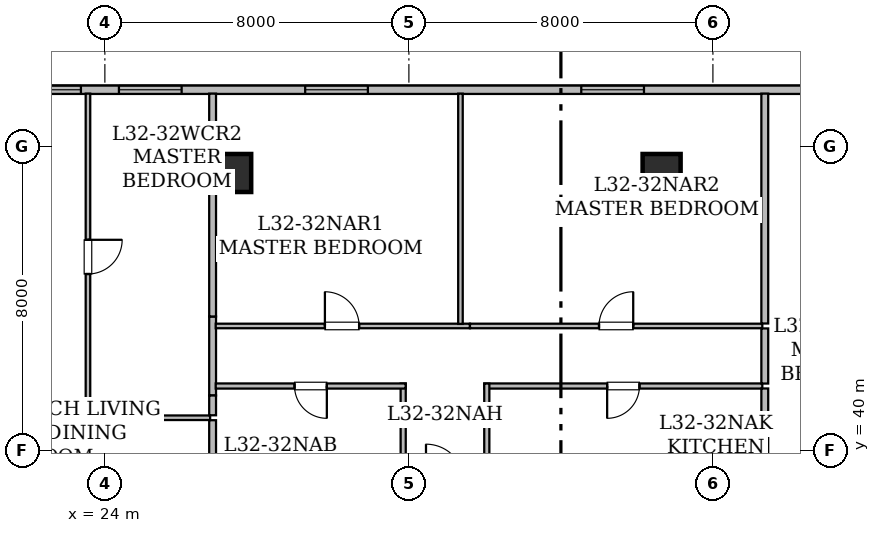
"""IFC4 building model, lengths in metres.
Left out: names, types, materials, properties, quantities, classifications, styles, units other than length and angle.
Written with IfcOpenShell. Run it as: python <this file> out.ifc"""

import sys

from ifc_helpers import new_model, si_unit, direction, frame, frame_2d, origin, origin_2d, place, context, subcontext, project, spatial, rectangle, hollow_rectangle, extrude, element, fill, save


model = new_model("IFC4")
c1 = context("Model", 3, precision=1e-05, world=origin(), true_north=direction((0.0, 1.0)))
c2 = subcontext(c1, "Body", "Model", "MODEL_VIEW")
j1 = project(units=[si_unit("LENGTHUNIT", "METRE"), si_unit("PLANEANGLEUNIT", "RADIAN")], contexts=[c1])
p1 = place(None, origin())
s1 = spatial("IfcSite", under=j1, at=p1, CompositionType="ELEMENT")
p2 = place(p1, origin())
s2 = spatial("IfcBuilding", under=s1, at=p2, CompositionType="ELEMENT")
p3 = place(p2, frame((0.0, 0.0, 127.45)))
s3 = spatial("IfcBuildingStorey", under=s2, at=p3, CompositionType="ELEMENT", Elevation=127.45)
for number, where, z_axis, x_axis in (
    (1, (27.35, 47.3, 0.0), (0.0, 0.0, 1.0), (1.0, 0.0, 0.0)),
    (2, (38.65, 47.3, 0.0), (0.0, 0.0, 1.0), (1.0, 0.0, 0.0)),
):
    element("IfcColumn", number, at=place(p3, frame(where, z_axis=z_axis, x_axis=x_axis)), inside=s3, PredefinedType="COLUMN", context=c2, shape_type="SweptSolid", body=[
        extrude(hollow_rectangle(XDim=1.0, YDim=1.0, WallThickness=0.05, at=origin_2d()), origin(), (0.0, 0.0, 1.0), 3.65),
    ])
p4 = place(p3, frame((13.715, 49.49, 0.0), z_axis=(0.0, 0.0, 1.0), x_axis=(1.0, 0.0, 0.0)))
e3 = element("IfcWall", 3, at=p4, inside=s3, PredefinedType="STANDARD", context=c2, shape_type="SweptSolid", body=[
    extrude(rectangle(XDim=38.639, YDim=0.22, at=frame_2d((19.319, 0.0))), origin(), (0.0, 0.0, 1.0), 3.43),
])
p5 = place(p4, frame((2.243, 0.0, 0.85)))
e4 = element("IfcOpeningElement", 4, at=p5, cuts=e3, PredefinedType="OPENING", context=c2, shape_type="SweptSolid", body=[
    extrude(rectangle(XDim=1.65, YDim=1.55, at=frame_2d((0.825, 0.775))), frame((0.0, 0.12, 0.0), z_axis=(0.0, -1.0, 0.0), x_axis=(1.0, 0.0, 0.0)), (0.0, 0.0, 1.0), 0.24),
])
p6 = place(p4, frame((8.455, 0.0, 0.8)))
e5 = element("IfcOpeningElement", 5, at=p6, cuts=e3, PredefinedType="OPENING", context=c2, shape_type="SweptSolid", body=[
    extrude(rectangle(XDim=1.2, YDim=1.5, at=frame_2d((0.6, 0.75))), frame((0.0, 0.12, 0.0), z_axis=(0.0, -1.0, 0.0), x_axis=(1.0, 0.0, 0.0)), (0.0, 0.0, 1.0), 0.24),
])
p7 = place(p4, frame((5.805, 0.0, 0.85)))
e6 = element("IfcOpeningElement", 6, at=p7, cuts=e3, PredefinedType="OPENING", context=c2, shape_type="SweptSolid", body=[
    extrude(rectangle(XDim=1.65, YDim=1.55, at=frame_2d((0.825, 0.775))), frame((0.0, 0.12, 0.0), z_axis=(0.0, -1.0, 0.0), x_axis=(1.0, 0.0, 0.0)), (0.0, 0.0, 1.0), 0.24),
])
p8 = place(p4, frame((10.655, 0.0, 0.85)))
e7 = element("IfcOpeningElement", 7, at=p8, cuts=e3, PredefinedType="OPENING", context=c2, shape_type="SweptSolid", body=[
    extrude(rectangle(XDim=1.65, YDim=1.55, at=frame_2d((0.825, 0.775))), frame((0.0, 0.12, 0.0), z_axis=(0.0, -1.0, 0.0), x_axis=(1.0, 0.0, 0.0)), (0.0, 0.0, 1.0), 0.24),
])
p9 = place(p4, frame((15.556, 0.0, 0.85)))
e8 = element("IfcOpeningElement", 8, at=p9, cuts=e3, PredefinedType="OPENING", context=c2, shape_type="SweptSolid", body=[
    extrude(rectangle(XDim=1.65, YDim=1.55, at=frame_2d((0.825, 0.775))), frame((0.0, 0.12, 0.0), z_axis=(0.0, -1.0, 0.0), x_axis=(1.0, 0.0, 0.0)), (0.0, 0.0, 1.0), 0.24),
])
p10 = place(p4, frame((22.821, 0.0, 0.85)))
e9 = element("IfcOpeningElement", 9, at=p10, cuts=e3, PredefinedType="OPENING", context=c2, shape_type="SweptSolid", body=[
    extrude(rectangle(XDim=1.65, YDim=1.55, at=frame_2d((0.825, 0.775))), frame((0.0, 0.12, 0.0), z_axis=(0.0, -1.0, 0.0), x_axis=(1.0, 0.0, 0.0)), (0.0, 0.0, 1.0), 0.24),
])
p11 = place(p4, frame((32.239, 0.0, 0.85)))
e10 = element("IfcOpeningElement", 10, at=p11, cuts=e3, PredefinedType="OPENING", context=c2, shape_type="SweptSolid", body=[
    extrude(rectangle(XDim=1.65, YDim=1.55, at=frame_2d((0.825, 0.775))), frame((0.0, 0.12, 0.0), z_axis=(0.0, -1.0, 0.0), x_axis=(1.0, 0.0, 0.0)), (0.0, 0.0, 1.0), 0.24),
])
p12 = place(p4, frame((28.676, 0.0, 0.85)))
e11 = element("IfcOpeningElement", 11, at=p12, cuts=e3, PredefinedType="OPENING", context=c2, shape_type="SweptSolid", body=[
    extrude(rectangle(XDim=1.65, YDim=1.55, at=frame_2d((0.825, 0.775))), frame((0.0, 0.12, 0.0), z_axis=(0.0, -1.0, 0.0), x_axis=(1.0, 0.0, 0.0)), (0.0, 0.0, 1.0), 0.24),
])
p13 = place(p4, frame((35.489, 0.0, 0.85)))
e12 = element("IfcOpeningElement", 12, at=p13, cuts=e3, PredefinedType="OPENING", context=c2, shape_type="SweptSolid", body=[
    extrude(rectangle(XDim=1.65, YDim=1.55, at=frame_2d((0.825, 0.775))), frame((0.0, 0.12, 0.0), z_axis=(0.0, -1.0, 0.0), x_axis=(1.0, 0.0, 0.0)), (0.0, 0.0, 1.0), 0.24),
])
p14 = place(p3, frame((23.555, 49.388, 0.0), z_axis=(0.0, 0.0, 1.0), x_axis=(0.0, -1.0, 0.0)))
e13 = element("IfcWall", 13, at=p14, inside=s3, PredefinedType="PARTITIONING", context=c2, shape_type="SweptSolid", body=[
    extrude(rectangle(XDim=8.593, YDim=0.12, at=frame_2d((4.296, 0.0))), origin(), (0.0, 0.0, 1.0), 2.876),
])
p15 = place(p14, frame((3.846, 0.0, 0.0)))
e14 = element("IfcOpeningElement", 14, at=p15, cuts=e13, PredefinedType="OPENING", context=c2, shape_type="SweptSolid", body=[
    extrude(rectangle(XDim=0.9, YDim=2.1, at=frame_2d((0.45, 1.05))), frame((0.0, 0.07, 0.0), z_axis=(0.0, -1.0, 0.0), x_axis=(1.0, 0.0, 0.0)), (0.0, 0.0, 1.0), 0.14),
])
p16 = place(p3, frame((23.49, 40.86, 0.0), z_axis=(0.0, 0.0, 1.0), x_axis=(1.0, 0.0, 0.0)))
e15 = element("IfcWall", 15, at=p16, inside=s3, PredefinedType="PARTITIONING", context=c2, shape_type="SweptSolid", body=[
    extrude(rectangle(XDim=3.28, YDim=0.12, at=frame_2d((1.64, 0.0))), origin(), (0.0, 0.0, 1.0), 3.43),
])
p17 = place(p3, frame((26.835, 40.795, 0.0), z_axis=(0.0, 0.0, 1.0), x_axis=(0.0, -1.0, 0.0)))
e16 = element("IfcWall", 16, at=p17, inside=s3, PredefinedType="STANDARD", context=c2, shape_type="SweptSolid", body=[
    extrude(rectangle(XDim=1.45, YDim=0.18, at=frame_2d((0.725, 0.0))), origin(), (0.0, 0.0, 1.0), 3.43),
])
p18 = place(p3, frame((26.835, 43.524, 0.0), z_axis=(0.0, 0.0, 1.0), x_axis=(0.0, -1.0, 0.0)))
e17 = element("IfcWall", 17, at=p18, inside=s3, PredefinedType="STANDARD", context=c2, shape_type="SweptSolid", body=[
    extrude(rectangle(XDim=2.078, YDim=0.18, at=frame_2d((1.039, 0.0))), origin(), (0.0, 0.0, 1.0), 3.43),
])
p19 = place(p3, frame((26.835, 41.446, 0.0), z_axis=(0.0, 0.0, 1.0), x_axis=(0.0, -1.0, 0.0)))
e18 = element("IfcWall", 18, at=p19, inside=s3, PredefinedType="STANDARD", context=c2, shape_type="SweptSolid", body=[
    extrude(rectangle(XDim=0.521, YDim=0.18, at=frame_2d((0.26, 0.0))), origin(), (0.0, 0.0, 1.0), 3.43),
])
p20 = place(p3, frame((26.835, 49.388, 0.0), z_axis=(0.0, 0.0, 1.0), x_axis=(0.0, -1.0, 0.0)))
e19 = element("IfcWall", 19, at=p20, inside=s3, PredefinedType="STANDARD", context=c2, shape_type="SweptSolid", body=[
    extrude(rectangle(XDim=5.864, YDim=0.18, at=frame_2d((2.932, 0.0))), origin(), (0.0, 0.0, 1.0), 2.876),
])
p21 = place(p3, frame((31.85, 39.232, 0.0), z_axis=(0.0, 0.0, 1.0), x_axis=(0.0, 1.0, 0.0)))
e20 = element("IfcWall", 20, at=p21, inside=s3, PredefinedType="PARTITIONING", context=c2, shape_type="SweptSolid", body=[
    extrude(rectangle(XDim=2.528, YDim=0.135, at=frame_2d((1.264, 0.0))), origin(), (0.0, 0.0, 1.0), 3.43),
])
p22 = place(p3, frame((31.915, 41.695, 0.0), z_axis=(0.0, 0.0, 1.0), x_axis=(-1.0, 0.0, 0.0)))
e21 = element("IfcWall", 21, at=p22, inside=s3, PredefinedType="PARTITIONING", context=c2, shape_type="SweptSolid", body=[
    extrude(rectangle(XDim=4.998, YDim=0.135, at=frame_2d((2.499, 0.0))), origin(), (0.0, 0.0, 1.0), 2.647),
])
p23 = place(p22, frame((2.074, 0.0, 0.0)))
e22 = element("IfcOpeningElement", 22, at=p23, cuts=e21, PredefinedType="OPENING", context=c2, shape_type="SweptSolid", body=[
    extrude(rectangle(XDim=0.85, YDim=2.1, at=frame_2d((0.425, 1.05))), frame((0.0, 0.077, 0.0), z_axis=(0.0, -1.0, 0.0), x_axis=(1.0, 0.0, 0.0)), (0.0, 0.0, 1.0), 0.155),
])
p24 = place(p3, frame((41.3, 41.695, 0.0), z_axis=(0.0, 0.0, 1.0), x_axis=(-1.0, 0.0, 0.0)))
e23 = element("IfcWall", 23, at=p24, inside=s3, PredefinedType="PARTITIONING", context=c2, shape_type="SweptSolid", body=[
    extrude(rectangle(XDim=7.315, YDim=0.135, at=frame_2d((3.657, 0.0))), origin(), (0.0, 0.0, 1.0), 2.647),
])
p25 = place(p24, frame((3.233, 0.0, 0.0)))
e24 = element("IfcOpeningElement", 24, at=p25, cuts=e23, PredefinedType="OPENING", context=c2, shape_type="SweptSolid", body=[
    extrude(rectangle(XDim=0.85, YDim=2.1, at=frame_2d((0.425, 1.05))), frame((0.0, 0.077, 0.0), z_axis=(0.0, -1.0, 0.0), x_axis=(1.0, 0.0, 0.0)), (0.0, 0.0, 1.0), 0.155),
])
p26 = place(p3, frame((34.05, 41.76, 0.0), z_axis=(0.0, 0.0, 1.0), x_axis=(0.0, -1.0, 0.0)))
e25 = element("IfcWall", 25, at=p26, inside=s3, PredefinedType="PARTITIONING", context=c2, shape_type="SweptSolid", body=[
    extrude(rectangle(XDim=2.528, YDim=0.135, at=frame_2d((1.264, 0.0))), origin(), (0.0, 0.0, 1.0), 3.43),
])
p27 = place(p3, frame((26.917, 43.275, 0.0), z_axis=(0.0, 0.0, 1.0), x_axis=(1.0, 0.0, 0.0)))
e26 = element("IfcWall", 26, at=p27, inside=s3, PredefinedType="PARTITIONING", context=c2, shape_type="SweptSolid", body=[
    extrude(rectangle(XDim=6.69, YDim=0.12, at=frame_2d((3.345, 0.0))), origin(), (0.0, 0.0, 1.0), 2.647),
])
p28 = place(p27, frame((2.873, 0.0, 0.0)))
e27 = element("IfcOpeningElement", 27, at=p28, cuts=e26, PredefinedType="OPENING", context=c2, shape_type="SweptSolid", body=[
    extrude(rectangle(XDim=0.9, YDim=2.1, at=frame_2d((0.45, 1.05))), frame((0.0, 0.07, 0.0), z_axis=(0.0, -1.0, 0.0), x_axis=(1.0, 0.0, 0.0)), (0.0, 0.0, 1.0), 0.14),
])
p29 = place(p3, frame((33.607, 43.275, 0.0), z_axis=(0.0, 0.0, 1.0), x_axis=(1.0, 0.0, 0.0)))
e28 = element("IfcWall", 28, at=p29, inside=s3, PredefinedType="PARTITIONING", context=c2, shape_type="SweptSolid", body=[
    extrude(rectangle(XDim=7.693, YDim=0.12, at=frame_2d((3.847, 0.0))), origin(), (0.0, 0.0, 1.0), 2.647),
])
p30 = place(p29, frame((3.396, 0.0, 0.0)))
e29 = element("IfcOpeningElement", 29, at=p30, cuts=e28, PredefinedType="OPENING", context=c2, shape_type="SweptSolid", body=[
    extrude(rectangle(XDim=0.9, YDim=2.1, at=frame_2d((0.45, 1.05))), frame((0.0, 0.07, 0.0), z_axis=(0.0, -1.0, 0.0), x_axis=(1.0, 0.0, 0.0)), (0.0, 0.0, 1.0), 0.14),
])
p31 = place(p3, frame((41.365, 43.21, 0.0), z_axis=(0.0, 0.0, 1.0), x_axis=(0.0, -1.0, 0.0)))
e30 = element("IfcWall", 30, at=p31, inside=s3, PredefinedType="STANDARD", context=c2, shape_type="SweptSolid", body=[
    extrude(rectangle(XDim=1.45, YDim=0.18, at=frame_2d((0.725, 0.0))), origin(), (0.0, 0.0, 1.0), 3.43),
])
p32 = place(p3, frame((41.365, 41.63, 0.0), z_axis=(0.0, 0.0, 1.0), x_axis=(0.0, -1.0, 0.0)))
e31 = element("IfcWall", 31, at=p32, inside=s3, PredefinedType="STANDARD", context=c2, shape_type="SweptSolid", body=[
    extrude(rectangle(XDim=2.4, YDim=0.18, at=frame_2d((1.2, 0.0))), origin(), (0.0, 0.0, 1.0), 3.43),
])
p33 = place(p3, frame((33.357, 49.388, 0.0), z_axis=(0.0, 0.0, 1.0), x_axis=(0.0, -1.0, 0.0)))
e32 = element("IfcWall", 32, at=p33, inside=s3, PredefinedType="PARTITIONING", context=c2, shape_type="SweptSolid", body=[
    extrude(rectangle(XDim=6.059, YDim=0.12, at=frame_2d((3.029, 0.0))), origin(), (0.0, 0.0, 1.0), 2.876),
])
p34 = place(p3, frame((41.365, 49.388, 0.0), z_axis=(0.0, 0.0, 1.0), x_axis=(0.0, -1.0, 0.0)))
e33 = element("IfcWall", 33, at=p34, inside=s3, PredefinedType="STANDARD", context=c2, shape_type="SweptSolid", body=[
    extrude(rectangle(XDim=6.048, YDim=0.18, at=frame_2d((3.024, 0.0))), origin(), (0.0, 0.0, 1.0), 2.876),
])
p35 = place(p6, origin())
e34 = element("IfcWindow", 34, at=p35, inside=s3, PartitioningType="SINGLE_PANEL", PredefinedType="WINDOW", context=c2, shape_type="SweptSolid", body=[
    extrude(rectangle(XDim=1.2, YDim=1.5, at=frame_2d((0.6, 0.75))), frame((0.0, 0.03, 0.0), z_axis=(0.0, -1.0, 0.0), x_axis=(1.0, 0.0, 0.0)), (0.0, 0.0, 1.0), 0.06),
])
fill(e5, e34)
p36 = place(p8, origin())
e35 = element("IfcWindow", 35, at=p36, inside=s3, PartitioningType="SINGLE_PANEL", PredefinedType="WINDOW", context=c2, shape_type="SweptSolid", body=[
    extrude(rectangle(XDim=1.65, YDim=1.55, at=frame_2d((0.825, 0.775))), frame((0.0, 0.03, 0.0), z_axis=(0.0, -1.0, 0.0), x_axis=(1.0, 0.0, 0.0)), (0.0, 0.0, 1.0), 0.06),
])
fill(e7, e35)
p37 = place(p9, origin())
e36 = element("IfcWindow", 36, at=p37, inside=s3, PartitioningType="SINGLE_PANEL", PredefinedType="WINDOW", context=c2, shape_type="SweptSolid", body=[
    extrude(rectangle(XDim=1.65, YDim=1.55, at=frame_2d((0.825, 0.775))), frame((0.0, 0.03, 0.0), z_axis=(0.0, -1.0, 0.0), x_axis=(1.0, 0.0, 0.0)), (0.0, 0.0, 1.0), 0.06),
])
fill(e8, e36)
p38 = place(p10, origin())
e37 = element("IfcWindow", 37, at=p38, inside=s3, PartitioningType="SINGLE_PANEL", PredefinedType="WINDOW", context=c2, shape_type="SweptSolid", body=[
    extrude(rectangle(XDim=1.65, YDim=1.55, at=frame_2d((0.825, 0.775))), frame((0.0, 0.03, 0.0), z_axis=(0.0, -1.0, 0.0), x_axis=(1.0, 0.0, 0.0)), (0.0, 0.0, 1.0), 0.06),
])
fill(e9, e37)
p39 = place(p15, origin())
e38 = element("IfcDoor", 38, at=p39, inside=s3, OperationType="SINGLE_SWING_LEFT", PredefinedType="DOOR", context=c2, shape_type="SweptSolid", body=[
    extrude(rectangle(XDim=0.9, YDim=2.1, at=frame_2d((0.45, 1.05))), frame((0.0, 0.025, 0.0), z_axis=(0.0, -1.0, 0.0), x_axis=(1.0, 0.0, 0.0)), (0.0, 0.0, 1.0), 0.05),
])
fill(e14, e38)
p40 = place(p23, origin())
e39 = element("IfcDoor", 39, at=p40, inside=s3, OperationType="SINGLE_SWING_LEFT", PredefinedType="DOOR", context=c2, shape_type="SweptSolid", body=[
    extrude(rectangle(XDim=0.85, YDim=2.1, at=frame_2d((0.425, 1.05))), frame((0.0, 0.025, 0.0), z_axis=(0.0, -1.0, 0.0), x_axis=(1.0, 0.0, 0.0)), (0.0, 0.0, 1.0), 0.05),
])
fill(e22, e39)
p41 = place(p25, origin())
e40 = element("IfcDoor", 40, at=p41, inside=s3, OperationType="SINGLE_SWING_RIGHT", PredefinedType="DOOR", context=c2, shape_type="SweptSolid", body=[
    extrude(rectangle(XDim=0.85, YDim=2.1, at=frame_2d((0.425, 1.05))), frame((0.0, 0.025, 0.0), z_axis=(0.0, -1.0, 0.0), x_axis=(1.0, 0.0, 0.0)), (0.0, 0.0, 1.0), 0.05),
])
fill(e24, e40)
p42 = place(p28, origin())
e41 = element("IfcDoor", 41, at=p42, inside=s3, OperationType="SINGLE_SWING_LEFT", PredefinedType="DOOR", context=c2, shape_type="SweptSolid", body=[
    extrude(rectangle(XDim=0.9, YDim=2.1, at=frame_2d((0.45, 1.05))), frame((0.0, 0.025, 0.0), z_axis=(0.0, -1.0, 0.0), x_axis=(1.0, 0.0, 0.0)), (0.0, 0.0, 1.0), 0.05),
])
fill(e27, e41)
p43 = place(p30, origin())
e42 = element("IfcDoor", 42, at=p43, inside=s3, OperationType="SINGLE_SWING_RIGHT", PredefinedType="DOOR", context=c2, shape_type="SweptSolid", body=[
    extrude(rectangle(XDim=0.9, YDim=2.1, at=frame_2d((0.45, 1.05))), frame((0.0, 0.025, 0.0), z_axis=(0.0, -1.0, 0.0), x_axis=(1.0, 0.0, 0.0)), (0.0, 0.0, 1.0), 0.05),
])
fill(e29, e42)
save(model, sys.argv[1])
